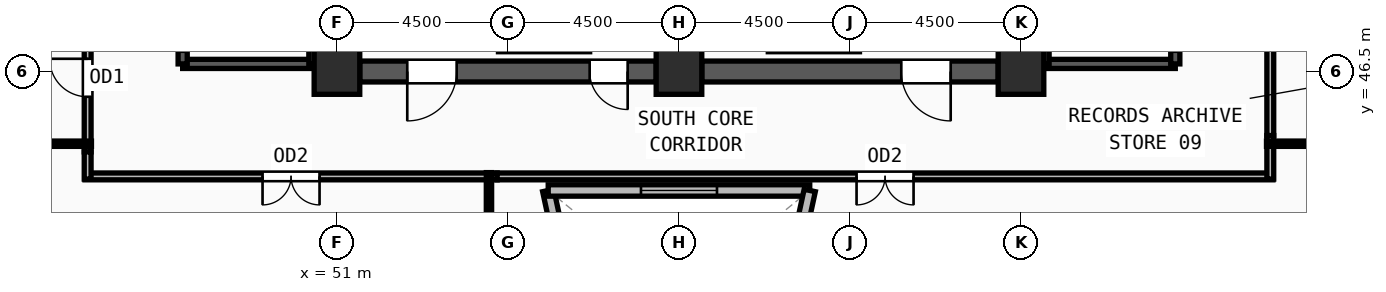
"""IFC4 building model, lengths in metres.
Left out: names, types, materials, properties, quantities, classifications, styles, units other than length and angle.
Written with IfcOpenShell. Run it as: python <this file> out.ifc"""

import sys

from ifc_helpers import new_model, si_unit, direction, frame, frame_2d, origin, origin_2d, place, context, subcontext, project, spatial, rectangle, extrude, source, transform, mapped, element, fill, save


model = new_model("IFC4")
c1 = context("Model", 3, precision=1e-05, world=origin(), true_north=direction((0.0, 1.0)))
c2 = subcontext(c1, "Body", "Model", "MODEL_VIEW")
j1 = project(units=[si_unit("LENGTHUNIT", "METRE"), si_unit("PLANEANGLEUNIT", "RADIAN")], contexts=[c1])
p1 = place(None, origin())
s1 = spatial("IfcSite", under=j1, at=p1, CompositionType="ELEMENT")
p2 = place(p1, origin())
s2 = spatial("IfcBuilding", under=s1, at=p2, CompositionType="ELEMENT")
p3 = place(p2, frame((0.0, 0.0, 309.0)))
s3 = spatial("IfcBuildingStorey", under=s2, at=p3, CompositionType="ELEMENT", Elevation=309.0)
m1 = source(origin(), c2, "Body", "SweptSolid", [
    extrude(rectangle(XDim=1.2, YDim=1.2, at=origin_2d()), origin(), (0.0, 0.0, 1.0), 3.75),
])
for number, where, z_axis, x_axis in (
    (1, (51.0, 46.5, 0.0), (0.0, 0.0, 1.0), (1.0, 0.0, 0.0)),
    (2, (60.0, 46.5, 0.0), (0.0, 0.0, 1.0), (1.0, 0.0, 0.0)),
    (3, (69.0, 46.5, 0.0), (0.0, 0.0, 1.0), (1.0, 0.0, 0.0)),
):
    element("IfcColumn", number, at=place(p3, frame(where, z_axis=z_axis, x_axis=x_axis)), inside=s3, PredefinedType="COLUMN", context=c2, shape_type="MappedRepresentation", body=[
        mapped(m1, transform((0.0, 0.0, 0.0), x_axis=(1.0, 0.0, 0.0), y_axis=(0.0, 1.0, 0.0), z_axis=(0.0, 0.0, 1.0), scale=1.0)),
    ])
p4 = place(p3, frame((40.132, 44.574, 0.0), z_axis=(0.0, 0.0, 1.0), x_axis=(0.557129450607, -0.830425659085, 0.0)))
e4 = element("IfcWall", 4, at=p4, inside=s3, PredefinedType="SOLIDWALL", context=c2, shape_type="SweptSolid", body=[
    extrude(rectangle(XDim=26.367, YDim=0.38, at=frame_2d((13.184, 0.0))), origin(), (0.0, 0.0, 1.0), 3.57),
])
m2 = source(origin(), c2, "Body", "SweptSolid", [
    extrude(rectangle(XDim=1.35, YDim=1.85, at=frame_2d((0.675, 0.925))), frame((0.0, 0.2, 0.0), z_axis=(0.0, -1.0, 0.0), x_axis=(1.0, 0.0, 0.0)), (0.0, 0.0, 1.0), 0.4),
])
p5 = place(p4, frame((5.917, 0.0, 0.55)))
e5 = element("IfcOpeningElement", 5, at=p5, cuts=e4, PredefinedType="OPENING", context=c2, shape_type="MappedRepresentation", body=[
    mapped(m2, transform((0.0, 0.0, 0.0), x_axis=(1.0, 0.0, 0.0), y_axis=(0.0, 1.0, 0.0), z_axis=(0.0, 0.0, 1.0), scale=1.0)),
])
p6 = place(p4, frame((12.509, 0.0, 0.55)))
e6 = element("IfcOpeningElement", 6, at=p6, cuts=e4, PredefinedType="OPENING", context=c2, shape_type="MappedRepresentation", body=[
    mapped(m2, transform((0.0, 0.0, 0.0), x_axis=(1.0, 0.0, 0.0), y_axis=(0.0, 1.0, 0.0), z_axis=(0.0, 0.0, 1.0), scale=1.0)),
])
p7 = place(p4, frame((19.1, 0.0, 0.55)))
e7 = element("IfcOpeningElement", 7, at=p7, cuts=e4, PredefinedType="OPENING", context=c2, shape_type="MappedRepresentation", body=[
    mapped(m2, transform((0.0, 0.0, 0.0), x_axis=(1.0, 0.0, 0.0), y_axis=(0.0, 1.0, 0.0), z_axis=(0.0, 0.0, 1.0), scale=1.0)),
])
p8 = place(p3, frame((68.4, 46.5, 0.0), z_axis=(0.0, 0.0, 1.0), x_axis=(-1.0, 0.0, 0.0)))
e8 = element("IfcWall", 8, at=p8, inside=s3, PredefinedType="SHEAR", context=c2, shape_type="SweptSolid", body=[
    extrude(rectangle(XDim=7.8, YDim=0.55, at=frame_2d((3.9, 0.0))), origin(), (0.0, 0.0, 1.0), 3.57),
])
m3 = source(origin(), c2, "Body", "SweptSolid", [
    extrude(rectangle(XDim=1.3, YDim=2.2, at=frame_2d((0.65, 1.1))), frame((0.0, 0.285, 0.0), z_axis=(0.0, -1.0, 0.0), x_axis=(1.0, 0.0, 0.0)), (0.0, 0.0, 1.0), 0.57),
])
p9 = place(p8, frame((1.25, 0.0, 0.0)))
e9 = element("IfcOpeningElement", 9, at=p9, cuts=e8, PredefinedType="OPENING", context=c2, shape_type="MappedRepresentation", body=[
    mapped(m3, transform((0.0, 0.0, 0.0), x_axis=(1.0, 0.0, 0.0), y_axis=(0.0, 1.0, 0.0), z_axis=(0.0, 0.0, 1.0), scale=1.0)),
])
p10 = place(p3, frame((59.4, 46.5, 0.0), z_axis=(0.0, 0.0, 1.0), x_axis=(-1.0, 0.0, 0.0)))
e10 = element("IfcWall", 10, at=p10, inside=s3, PredefinedType="SHEAR", context=c2, shape_type="SweptSolid", body=[
    extrude(rectangle(XDim=7.8, YDim=0.55, at=frame_2d((3.9, 0.0))), origin(), (0.0, 0.0, 1.0), 3.57),
])
p11 = place(p10, frame((5.25, 0.0, 0.0)))
e11 = element("IfcOpeningElement", 11, at=p11, cuts=e10, PredefinedType="OPENING", context=c2, shape_type="MappedRepresentation", body=[
    mapped(m3, transform((0.0, 0.0, 0.0), x_axis=(1.0, 0.0, 0.0), y_axis=(0.0, 1.0, 0.0), z_axis=(0.0, 0.0, 1.0), scale=1.0)),
])
m4 = source(origin(), c2, "Body", "SweptSolid", [
    extrude(rectangle(XDim=1.0, YDim=2.2, at=frame_2d((0.5, 1.1))), frame((0.0, 0.285, 0.0), z_axis=(0.0, -1.0, 0.0), x_axis=(1.0, 0.0, 0.0)), (0.0, 0.0, 1.0), 0.57),
])
p12 = place(p10, frame((0.75, 0.0, 0.0)))
e12 = element("IfcOpeningElement", 12, at=p12, cuts=e10, PredefinedType="OPENING", context=c2, shape_type="MappedRepresentation", body=[
    mapped(m4, transform((0.0, 0.0, 0.0), x_axis=(1.0, 0.0, 0.0), y_axis=(0.0, 1.0, 0.0), z_axis=(0.0, 0.0, 1.0), scale=1.0)),
])
p13 = place(p3, frame((46.94, 46.7, 0.0), z_axis=(0.0, 0.0, 1.0), x_axis=(1.0, 0.0, 0.0)))
e13 = element("IfcWall", 13, at=p13, inside=s3, PredefinedType="SOLIDWALL", context=c2, shape_type="SweptSolid", body=[
    extrude(rectangle(XDim=3.44, YDim=0.24, at=frame_2d((1.72, 0.0))), origin(), (0.0, 0.0, 1.0), 3.57),
])
p14 = place(p3, frame((50.38, 46.7, 0.0), z_axis=(0.0, 0.0, 1.0), x_axis=(0.0, 1.0, 0.0)))
e14 = element("IfcWall", 14, at=p14, inside=s3, PredefinedType="SOLIDWALL", context=c2, shape_type="SweptSolid", body=[
    extrude(rectangle(XDim=7.82, YDim=0.24, at=frame_2d((3.91, 0.0))), origin(), (0.0, 0.0, 1.0), 3.57),
])
p15 = place(p3, frame((46.94, 54.52, 0.0), z_axis=(0.0, 0.0, 1.0), x_axis=(0.0, -1.0, 0.0)))
e15 = element("IfcWall", 15, at=p15, inside=s3, PredefinedType="SOLIDWALL", context=c2, shape_type="SweptSolid", body=[
    extrude(rectangle(XDim=7.82, YDim=0.24, at=frame_2d((3.91, 0.0))), origin(), (0.0, 0.0, 1.0), 3.57),
])
m5 = source(origin(), c2, "Body", "SweptSolid", [
    extrude(rectangle(XDim=1.2, YDim=2.2, at=frame_2d((0.6, 1.1))), frame((0.0, 0.13, 0.0), z_axis=(0.0, -1.0, 0.0), x_axis=(1.0, 0.0, 0.0)), (0.0, 0.0, 1.0), 0.26),
])
p16 = place(p15, frame((6.3, 0.0, 0.0)))
e16 = element("IfcOpeningElement", 16, at=p16, cuts=e15, PredefinedType="OPENING", context=c2, shape_type="MappedRepresentation", body=[
    mapped(m5, transform((0.0, 0.0, 0.0), x_axis=(1.0, 0.0, 0.0), y_axis=(0.0, 1.0, 0.0), z_axis=(0.0, 0.0, 1.0), scale=1.0)),
])
p17 = place(p3, frame((69.62, 46.7, 0.0), z_axis=(0.0, 0.0, 1.0), x_axis=(1.0, 0.0, 0.0)))
e17 = element("IfcWall", 17, at=p17, inside=s3, PredefinedType="SOLIDWALL", context=c2, shape_type="SweptSolid", body=[
    extrude(rectangle(XDim=3.44, YDim=0.24, at=frame_2d((1.72, 0.0))), origin(), (0.0, 0.0, 1.0), 3.57),
])
p18 = place(p3, frame((73.06, 46.7, 0.0), z_axis=(0.0, 0.0, 1.0), x_axis=(0.0, 1.0, 0.0)))
e18 = element("IfcWall", 18, at=p18, inside=s3, PredefinedType="SOLIDWALL", context=c2, shape_type="SweptSolid", body=[
    extrude(rectangle(XDim=7.82, YDim=0.24, at=frame_2d((3.91, 0.0))), origin(), (0.0, 0.0, 1.0), 3.57),
])
p19 = place(p18, frame((0.32, 0.0, 0.0)))
e19 = element("IfcOpeningElement", 19, at=p19, cuts=e18, PredefinedType="OPENING", context=c2, shape_type="MappedRepresentation", body=[
    mapped(m5, transform((0.0, 0.0, 0.0), x_axis=(1.0, 0.0, 0.0), y_axis=(0.0, 1.0, 0.0), z_axis=(0.0, 0.0, 1.0), scale=1.0)),
])
p20 = place(p3, frame((69.62, 54.52, 0.0), z_axis=(0.0, 0.0, 1.0), x_axis=(0.0, -1.0, 0.0)))
e20 = element("IfcWall", 20, at=p20, inside=s3, PredefinedType="SOLIDWALL", context=c2, shape_type="SweptSolid", body=[
    extrude(rectangle(XDim=7.82, YDim=0.24, at=frame_2d((3.91, 0.0))), origin(), (0.0, 0.0, 1.0), 3.57),
])
p21 = place(p3, frame((57.764, 37.801, 0.0), z_axis=(0.0, 0.0, 1.0), x_axis=(-0.21145116659, 0.977388563545, 0.0)))
e21 = element("IfcWall", 21, at=p21, inside=s3, PredefinedType="SOLIDWALL", context=c2, shape_type="SweptSolid", body=[
    extrude(rectangle(XDim=5.698, YDim=0.3, at=frame_2d((2.849, 0.0))), origin(), (0.0, 0.0, 1.0), 3.57),
])
m6 = source(origin(), c2, "Body", "SweptSolid", [
    extrude(rectangle(XDim=2.0, YDim=1.9, at=frame_2d((1.0, 0.95))), frame((0.0, 0.16, 0.0), z_axis=(0.0, -1.0, 0.0), x_axis=(1.0, 0.0, 0.0)), (0.0, 0.0, 1.0), 0.32),
])
p22 = place(p21, frame((1.849, 0.0, 0.55)))
e22 = element("IfcOpeningElement", 22, at=p22, cuts=e21, PredefinedType="OPENING", context=c2, shape_type="MappedRepresentation", body=[
    mapped(m6, transform((0.0, 0.0, 0.0), x_axis=(1.0, 0.0, 0.0), y_axis=(0.0, 1.0, 0.0), z_axis=(0.0, 0.0, 1.0), scale=1.0)),
])
p23 = place(p3, frame((56.559, 43.37, 0.0), z_axis=(0.0, 0.0, 1.0), x_axis=(1.0, 0.0, 0.0)))
e23 = element("IfcWall", 23, at=p23, inside=s3, PredefinedType="SOLIDWALL", context=c2, shape_type="SweptSolid", body=[
    extrude(rectangle(XDim=6.882, YDim=0.3, at=frame_2d((3.441, 0.0))), origin(), (0.0, 0.0, 1.0), 3.57),
])
p24 = place(p23, frame((2.441, 0.0, 0.55)))
e24 = element("IfcOpeningElement", 24, at=p24, cuts=e23, PredefinedType="OPENING", context=c2, shape_type="MappedRepresentation", body=[
    mapped(m6, transform((0.0, 0.0, 0.0), x_axis=(1.0, 0.0, 0.0), y_axis=(0.0, 1.0, 0.0), z_axis=(0.0, 0.0, 1.0), scale=1.0)),
])
p25 = place(p3, frame((63.441, 43.37, 0.0), z_axis=(0.0, 0.0, 1.0), x_axis=(-0.21145116659, -0.977388563545, 0.0)))
e25 = element("IfcWall", 25, at=p25, inside=s3, PredefinedType="SOLIDWALL", context=c2, shape_type="SweptSolid", body=[
    extrude(rectangle(XDim=5.698, YDim=0.3, at=frame_2d((2.849, 0.0))), origin(), (0.0, 0.0, 1.0), 3.57),
])
p26 = place(p25, frame((1.849, 0.0, 0.55)))
e26 = element("IfcOpeningElement", 26, at=p26, cuts=e25, PredefinedType="OPENING", context=c2, shape_type="MappedRepresentation", body=[
    mapped(m6, transform((0.0, 0.0, 0.0), x_axis=(1.0, 0.0, 0.0), y_axis=(0.0, 1.0, 0.0), z_axis=(0.0, 0.0, 1.0), scale=1.0)),
])
p27 = place(p3, frame((44.44, 44.385, 0.0), z_axis=(0.0, 0.0, 1.0), x_axis=(0.0, 1.0, 0.0)))
e27 = element("IfcWall", 27, at=p27, inside=s3, PredefinedType="PARTITIONING", context=c2, shape_type="SweptSolid", body=[
    extrude(rectangle(XDim=3.9, YDim=0.18, at=frame_2d((1.95, 0.0))), origin(), (0.0, 0.0, 1.0), 3.57),
])
m7 = source(origin(), c2, "Body", "SweptSolid", [
    extrude(rectangle(XDim=1.0, YDim=2.2, at=frame_2d((0.5, 1.1))), frame((0.0, 0.1, 0.0), z_axis=(0.0, -1.0, 0.0), x_axis=(1.0, 0.0, 0.0)), (0.0, 0.0, 1.0), 0.2),
])
p28 = place(p27, frame((1.45, 0.0, 0.0)))
e28 = element("IfcOpeningElement", 28, at=p28, cuts=e27, PredefinedType="OPENING", context=c2, shape_type="MappedRepresentation", body=[
    mapped(m7, transform((0.0, 0.0, 0.0), x_axis=(1.0, 0.0, 0.0), y_axis=(0.0, 1.0, 0.0), z_axis=(0.0, 0.0, 1.0), scale=1.0)),
])
p29 = place(p3, frame((55.215, 43.74, 0.0), z_axis=(0.0, 0.0, 1.0), x_axis=(-1.0, 0.0, 0.0)))
e29 = element("IfcWall", 29, at=p29, inside=s3, PredefinedType="PARTITIONING", context=c2, shape_type="SweptSolid", body=[
    extrude(rectangle(XDim=10.845, YDim=0.18, at=frame_2d((5.422, 0.0))), origin(), (0.0, 0.0, 1.0), 3.57),
])
m8 = source(origin(), c2, "Body", "SweptSolid", [
    extrude(rectangle(XDim=1.5, YDim=2.2, at=frame_2d((0.75, 1.1))), frame((0.0, 0.1, 0.0), z_axis=(0.0, -1.0, 0.0), x_axis=(1.0, 0.0, 0.0)), (0.0, 0.0, 1.0), 0.2),
])
p30 = place(p29, frame((4.673, 0.0, 0.0)))
e30 = element("IfcOpeningElement", 30, at=p30, cuts=e29, PredefinedType="OPENING", context=c2, shape_type="MappedRepresentation", body=[
    mapped(m8, transform((0.0, 0.0, 0.0), x_axis=(1.0, 0.0, 0.0), y_axis=(0.0, 1.0, 0.0), z_axis=(0.0, 0.0, 1.0), scale=1.0)),
])
p31 = place(p3, frame((75.63, 43.74, 0.0), z_axis=(0.0, 0.0, 1.0), x_axis=(-1.0, 0.0, 0.0)))
e31 = element("IfcWall", 31, at=p31, inside=s3, PredefinedType="PARTITIONING", context=c2, shape_type="SweptSolid", body=[
    extrude(rectangle(XDim=20.415, YDim=0.18, at=frame_2d((10.208, 0.0))), origin(), (0.0, 0.0, 1.0), 3.57),
])
p32 = place(p31, frame((9.457, 0.0, 0.0)))
e32 = element("IfcOpeningElement", 32, at=p32, cuts=e31, PredefinedType="OPENING", context=c2, shape_type="MappedRepresentation", body=[
    mapped(m8, transform((0.0, 0.0, 0.0), x_axis=(1.0, 0.0, 0.0), y_axis=(0.0, 1.0, 0.0), z_axis=(0.0, 0.0, 1.0), scale=1.0)),
])
p33 = place(p3, frame((44.44, 43.67, 0.0), z_axis=(0.0, 0.0, 1.0), x_axis=(0.0, 1.0, 0.0)))
e33 = element("IfcWall", 33, at=p33, inside=s3, PredefinedType="PARTITIONING", context=c2, shape_type="SweptSolid", body=[
    extrude(rectangle(XDim=0.715, YDim=0.18, at=frame_2d((0.357, 0.0))), origin(), (0.0, 0.0, 1.0), 3.57),
])
p34 = place(p3, frame((75.56, 44.815, 0.0), z_axis=(0.0, 0.0, 1.0), x_axis=(0.0, -1.0, 0.0)))
e34 = element("IfcWall", 34, at=p34, inside=s3, PredefinedType="PARTITIONING", context=c2, shape_type="SweptSolid", body=[
    extrude(rectangle(XDim=1.145, YDim=0.18, at=frame_2d((0.573, 0.0))), origin(), (0.0, 0.0, 1.0), 3.57),
])
p35 = place(p3, frame((75.56, 48.21, 0.0), z_axis=(0.0, 0.0, 1.0), x_axis=(0.0, -1.0, 0.0)))
e35 = element("IfcWall", 35, at=p35, inside=s3, PredefinedType="PARTITIONING", context=c2, shape_type="SweptSolid", body=[
    extrude(rectangle(XDim=3.395, YDim=0.18, at=frame_2d((1.698, 0.0))), origin(), (0.0, 0.0, 1.0), 3.57),
])
p36 = place(p3, frame((44.54, 44.6, 0.0), z_axis=(0.0, 0.0, 1.0), x_axis=(-1.0, 0.0, 0.0)))
e36 = element("IfcWall", 36, at=p36, inside=s3, PredefinedType="PARTITIONING", context=c2, shape_type="SweptSolid", body=[
    extrude(rectangle(XDim=5.184, YDim=0.14, at=frame_2d((2.592, 0.0))), origin(), (0.0, 0.0, 1.0), 3.57),
])
p37 = place(p3, frame((75.46, 44.6, 0.0), z_axis=(0.0, 0.0, 1.0), x_axis=(1.0, 0.0, 0.0)))
e37 = element("IfcWall", 37, at=p37, inside=s3, PredefinedType="PARTITIONING", context=c2, shape_type="SweptSolid", body=[
    extrude(rectangle(XDim=4.857, YDim=0.14, at=frame_2d((2.428, 0.0))), origin(), (0.0, 0.0, 1.0), 3.57),
])
p38 = place(p3, frame((55.0, 43.84, 0.0), z_axis=(0.0, 0.0, 1.0), x_axis=(0.0, -1.0, 0.0)))
e38 = element("IfcWall", 38, at=p38, inside=s3, PredefinedType="PARTITIONING", context=c2, shape_type="SweptSolid", body=[
    extrude(rectangle(XDim=22.288, YDim=0.14, at=frame_2d((11.144, 0.0))), origin(), (0.0, 0.0, 1.0), 2.967),
])
m9 = source(origin(), c2, "Body", "SweptSolid", [
    extrude(rectangle(XDim=1.3, YDim=2.2, at=frame_2d((0.65, 1.1))), frame((0.0, 0.025, 0.0), z_axis=(0.0, -1.0, 0.0), x_axis=(1.0, 0.0, 0.0)), (0.0, 0.0, 1.0), 0.05),
])
p39 = place(p11, origin())
e39 = element("IfcDoor", 39, at=p39, inside=s3, OperationType="SINGLE_SWING_RIGHT", PredefinedType="DOOR", context=c2, shape_type="MappedRepresentation", body=[
    mapped(m9, transform((0.0, 0.0, 0.0), x_axis=(1.0, 0.0, 0.0), y_axis=(0.0, 1.0, 0.0), z_axis=(0.0, 0.0, 1.0), scale=1.0)),
])
fill(e11, e39)
m10 = source(origin(), c2, "Body", "SweptSolid", [
    extrude(rectangle(XDim=1.0, YDim=2.2, at=frame_2d((0.5, 1.1))), frame((0.0, 0.025, 0.0), z_axis=(0.0, -1.0, 0.0), x_axis=(1.0, 0.0, 0.0)), (0.0, 0.0, 1.0), 0.05),
])
p40 = place(p12, origin())
e40 = element("IfcDoor", 40, at=p40, inside=s3, OperationType="SINGLE_SWING_LEFT", PredefinedType="DOOR", context=c2, shape_type="MappedRepresentation", body=[
    mapped(m10, transform((0.0, 0.0, 0.0), x_axis=(1.0, 0.0, 0.0), y_axis=(0.0, 1.0, 0.0), z_axis=(0.0, 0.0, 1.0), scale=1.0)),
])
fill(e12, e40)
p41 = place(p9, origin())
e41 = element("IfcDoor", 41, at=p41, inside=s3, OperationType="SINGLE_SWING_LEFT", PredefinedType="DOOR", context=c2, shape_type="MappedRepresentation", body=[
    mapped(m9, transform((0.0, 0.0, 0.0), x_axis=(1.0, 0.0, 0.0), y_axis=(0.0, 1.0, 0.0), z_axis=(0.0, 0.0, 1.0), scale=1.0)),
])
fill(e9, e41)
m11 = source(origin(), c2, "Body", "SweptSolid", [
    extrude(rectangle(XDim=2.0, YDim=1.9, at=frame_2d((1.0, 0.95))), frame((0.0, 0.03, 0.0), z_axis=(0.0, -1.0, 0.0), x_axis=(1.0, 0.0, 0.0)), (0.0, 0.0, 1.0), 0.06),
])
p42 = place(p24, origin())
e42 = element("IfcWindow", 42, at=p42, inside=s3, PartitioningType="DOUBLE_PANEL_VERTICAL", PredefinedType="WINDOW", context=c2, shape_type="MappedRepresentation", body=[
    mapped(m11, transform((0.0, 0.0, 0.0), x_axis=(1.0, 0.0, 0.0), y_axis=(0.0, 1.0, 0.0), z_axis=(0.0, 0.0, 1.0), scale=1.0)),
])
fill(e24, e42)
p43 = place(p28, origin())
e43 = element("IfcDoor", 43, at=p43, inside=s3, OperationType="SINGLE_SWING_RIGHT", PredefinedType="DOOR", context=c2, shape_type="MappedRepresentation", body=[
    mapped(m10, transform((0.0, 0.0, 0.0), x_axis=(1.0, 0.0, 0.0), y_axis=(0.0, 1.0, 0.0), z_axis=(0.0, 0.0, 1.0), scale=1.0)),
])
fill(e28, e43)
m12 = source(origin(), c2, "Body", "SweptSolid", [
    extrude(rectangle(XDim=1.5, YDim=2.2, at=frame_2d((0.75, 1.1))), frame((0.0, 0.025, 0.0), z_axis=(0.0, -1.0, 0.0), x_axis=(1.0, 0.0, 0.0)), (0.0, 0.0, 1.0), 0.05),
])
p44 = place(p30, origin())
e44 = element("IfcDoor", 44, at=p44, inside=s3, OperationType="DOUBLE_DOOR_SINGLE_SWING", PredefinedType="DOOR", context=c2, shape_type="MappedRepresentation", body=[
    mapped(m12, transform((0.0, 0.0, 0.0), x_axis=(1.0, 0.0, 0.0), y_axis=(0.0, 1.0, 0.0), z_axis=(0.0, 0.0, 1.0), scale=1.0)),
])
fill(e30, e44)
p45 = place(p32, origin())
e45 = element("IfcDoor", 45, at=p45, inside=s3, OperationType="DOUBLE_DOOR_SINGLE_SWING", PredefinedType="DOOR", context=c2, shape_type="MappedRepresentation", body=[
    mapped(m12, transform((0.0, 0.0, 0.0), x_axis=(1.0, 0.0, 0.0), y_axis=(0.0, 1.0, 0.0), z_axis=(0.0, 0.0, 1.0), scale=1.0)),
])
fill(e32, e45)
save(model, sys.argv[1])
